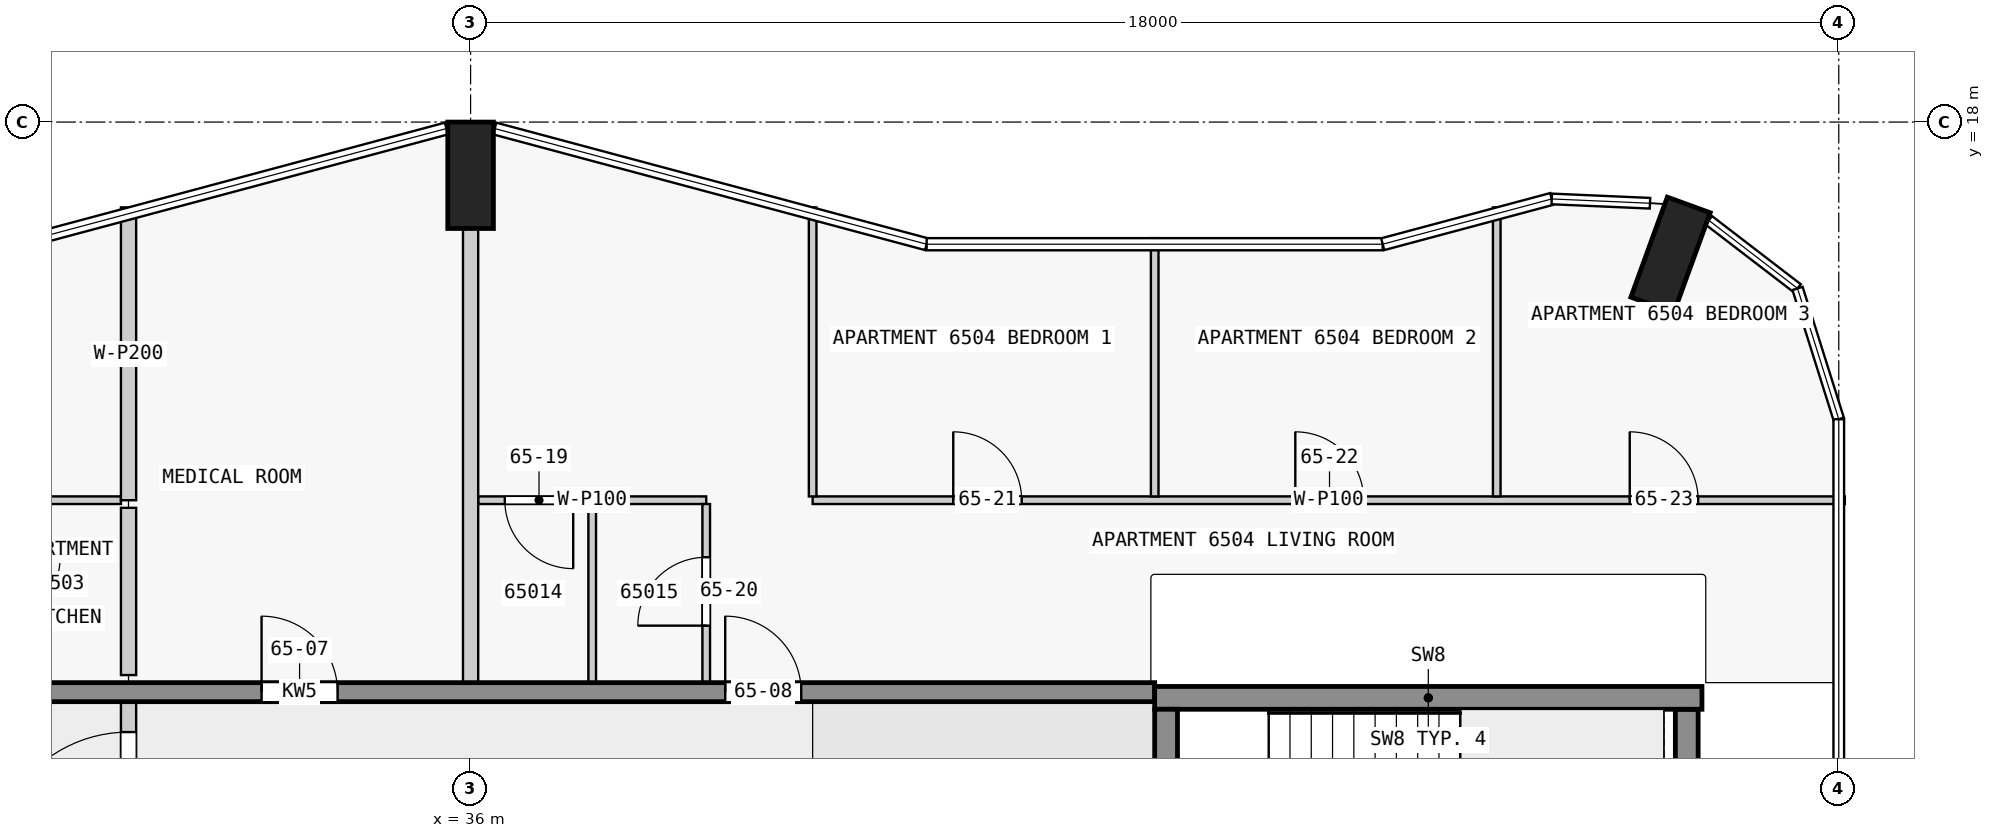
"""IFC4 building model, lengths in metres.
Left out: names, types, materials, properties, quantities, classifications, styles, units other than length and angle.
Written with IfcOpenShell. Run it as: python <this file> out.ifc"""

import sys

from ifc_helpers import new_model, si_unit, direction, frame, frame_2d, origin, origin_2d, place, context, subcontext, project, spatial, rectangle, extrude, element, fill, save


model = new_model("IFC4")
c1 = context("Model", 3, precision=1e-05, world=origin(), true_north=direction((0.0, 1.0)))
c2 = subcontext(c1, "Body", "Model", "MODEL_VIEW")
j1 = project(units=[si_unit("LENGTHUNIT", "METRE"), si_unit("PLANEANGLEUNIT", "RADIAN")], contexts=[c1])
p1 = place(None, origin())
s1 = spatial("IfcSite", under=j1, at=p1, CompositionType="ELEMENT")
p2 = place(p1, origin())
s2 = spatial("IfcBuilding", under=s1, at=p2, CompositionType="ELEMENT")
p3 = place(p2, frame((0.0, 0.0, 249.4)))
s3 = spatial("IfcBuildingStorey", under=s2, at=p3, CompositionType="ELEMENT", Elevation=249.4)
for number, where, z_axis, x_axis in (
    (1, (51.787, 16.252, 0.0), (0.0, 0.0, 1.0), (-0.94, 0.342, 0.0)),
    (2, (36.0, 17.3, 0.0), (0.0, 0.0, 1.0), (1.0, 0.0, 0.0)),
):
    element("IfcColumn", number, at=place(p3, frame(where, z_axis=z_axis, x_axis=x_axis)), inside=s3, PredefinedType="COLUMN", context=c2, shape_type="SweptSolid", body=[
        extrude(rectangle(XDim=0.6, YDim=1.4, at=origin_2d()), origin(), (0.0, 0.0, 1.0), 3.5),
    ])
p4 = place(p3, frame((45.15, 7.725, 0.0), z_axis=(0.0, 0.0, 1.0), x_axis=(0.0, 1.0, 0.0)))
e3 = element("IfcWall", 3, at=p4, inside=s3, PredefinedType="SHEAR", context=c2, shape_type="SweptSolid", body=[
    extrude(rectangle(XDim=2.55, YDim=0.3, at=frame_2d((1.275, 0.0))), origin(), (0.0, 0.0, 1.0), 3.5),
])
p5 = place(p4, frame((0.725, 0.0, 0.0)))
e4 = element("IfcOpeningElement", 4, at=p5, cuts=e3, PredefinedType="OPENING", context=c2, shape_type="SweptSolid", body=[
    extrude(rectangle(XDim=1.1, YDim=2.1, at=frame_2d((0.55, 1.05))), frame((0.0, 0.16, 0.0), z_axis=(0.0, -1.0, 0.0), x_axis=(1.0, 0.0, 0.0)), (0.0, 0.0, 1.0), 0.32),
])
p6 = place(p3, frame((52.0, 7.725, 0.0), z_axis=(0.0, 0.0, 1.0), x_axis=(0.0, 1.0, 0.0)))
e5 = element("IfcWall", 5, at=p6, inside=s3, PredefinedType="SHEAR", context=c2, shape_type="SweptSolid", body=[
    extrude(rectangle(XDim=2.55, YDim=0.3, at=frame_2d((1.275, 0.0))), origin(), (0.0, 0.0, 1.0), 3.5),
])
p7 = place(p3, frame((45.0, 10.425, 0.0), z_axis=(0.0, 0.0, 1.0), x_axis=(1.0, 0.0, 0.0)))
e6 = element("IfcWall", 6, at=p7, inside=s3, PredefinedType="SHEAR", context=c2, shape_type="SweptSolid", body=[
    extrude(rectangle(XDim=7.2, YDim=0.3, at=frame_2d((3.6, 0.0))), origin(), (0.0, 0.0, 1.0), 3.5),
])
p8 = place(p3, frame((22.5, 10.5, 0.0), z_axis=(0.0, 0.0, 1.0), x_axis=(1.0, 0.0, 0.0)))
e7 = element("IfcWall", 7, at=p8, inside=s3, PredefinedType="SHEAR", context=c2, shape_type="SweptSolid", body=[
    extrude(rectangle(XDim=22.5, YDim=0.25, at=frame_2d((11.25, 0.0))), origin(), (0.0, 0.0, 1.0), 3.25),
])
p9 = place(p8, frame((4.05, 0.0, 0.0)))
e8 = element("IfcOpeningElement", 8, at=p9, cuts=e7, PredefinedType="OPENING", context=c2, shape_type="SweptSolid", body=[
    extrude(rectangle(XDim=1.0, YDim=2.1, at=frame_2d((0.5, 1.05))), frame((0.0, 0.135, 0.0), z_axis=(0.0, -1.0, 0.0), x_axis=(1.0, 0.0, 0.0)), (0.0, 0.0, 1.0), 0.27),
])
p10 = place(p8, frame((10.75, 0.0, 0.0)))
e9 = element("IfcOpeningElement", 9, at=p10, cuts=e7, PredefinedType="OPENING", context=c2, shape_type="SweptSolid", body=[
    extrude(rectangle(XDim=1.0, YDim=2.1, at=frame_2d((0.5, 1.05))), frame((0.0, 0.135, 0.0), z_axis=(0.0, -1.0, 0.0), x_axis=(1.0, 0.0, 0.0)), (0.0, 0.0, 1.0), 0.27),
])
p11 = place(p8, frame((16.85, 0.0, 0.0)))
e10 = element("IfcOpeningElement", 10, at=p11, cuts=e7, PredefinedType="OPENING", context=c2, shape_type="SweptSolid", body=[
    extrude(rectangle(XDim=1.0, YDim=2.1, at=frame_2d((0.5, 1.05))), frame((0.0, 0.135, 0.0), z_axis=(0.0, -1.0, 0.0), x_axis=(1.0, 0.0, 0.0)), (0.0, 0.0, 1.0), 0.27),
])
p12 = place(p3, frame((31.4, 13.025, 0.0), z_axis=(0.0, 0.0, 1.0), x_axis=(-1.0, 0.0, 0.0)))
e11 = element("IfcWall", 11, at=p12, inside=s3, PredefinedType="PARTITIONING", context=c2, shape_type="SweptSolid", body=[
    extrude(rectangle(XDim=1.65, YDim=0.1, at=frame_2d((0.825, 0.0))), origin(), (0.0, 0.0, 1.0), 3.25),
])
p13 = place(p3, frame((39.1, 13.025, 0.0), z_axis=(0.0, 0.0, 1.0), x_axis=(-1.0, 0.0, 0.0)))
e12 = element("IfcWall", 12, at=p13, inside=s3, PredefinedType="PARTITIONING", context=c2, shape_type="SweptSolid", body=[
    extrude(rectangle(XDim=3.0, YDim=0.1, at=frame_2d((1.5, 0.0))), origin(), (0.0, 0.0, 1.0), 3.25),
])
p14 = place(p13, frame((1.75, 0.0, 0.0)))
e13 = element("IfcOpeningElement", 13, at=p14, cuts=e12, PredefinedType="OPENING", context=c2, shape_type="SweptSolid", body=[
    extrude(rectangle(XDim=0.9, YDim=2.1, at=frame_2d((0.45, 1.05))), frame((0.0, 0.06, 0.0), z_axis=(0.0, -1.0, 0.0), x_axis=(1.0, 0.0, 0.0)), (0.0, 0.0, 1.0), 0.12),
])
p15 = place(p3, frame((40.5, 13.025, 0.0), z_axis=(0.0, 0.0, 1.0), x_axis=(1.0, 0.0, 0.0)))
e14 = element("IfcWall", 14, at=p15, inside=s3, PredefinedType="PARTITIONING", context=c2, shape_type="SweptSolid", body=[
    extrude(rectangle(XDim=13.58, YDim=0.1, at=frame_2d((6.79, 0.0))), origin(), (0.0, 0.0, 1.0), 3.25),
])
p16 = place(p15, frame((1.85, 0.0, 0.0)))
e15 = element("IfcOpeningElement", 15, at=p16, cuts=e14, PredefinedType="OPENING", context=c2, shape_type="SweptSolid", body=[
    extrude(rectangle(XDim=0.9, YDim=2.1, at=frame_2d((0.45, 1.05))), frame((0.0, 0.06, 0.0), z_axis=(0.0, -1.0, 0.0), x_axis=(1.0, 0.0, 0.0)), (0.0, 0.0, 1.0), 0.12),
])
p17 = place(p15, frame((6.35, 0.0, 0.0)))
e16 = element("IfcOpeningElement", 16, at=p17, cuts=e14, PredefinedType="OPENING", context=c2, shape_type="SweptSolid", body=[
    extrude(rectangle(XDim=0.9, YDim=2.1, at=frame_2d((0.45, 1.05))), frame((0.0, 0.06, 0.0), z_axis=(0.0, -1.0, 0.0), x_axis=(1.0, 0.0, 0.0)), (0.0, 0.0, 1.0), 0.12),
])
p18 = place(p15, frame((10.75, 0.0, 0.0)))
e17 = element("IfcOpeningElement", 17, at=p18, cuts=e14, PredefinedType="OPENING", context=c2, shape_type="SweptSolid", body=[
    extrude(rectangle(XDim=0.9, YDim=2.1, at=frame_2d((0.45, 1.05))), frame((0.0, 0.06, 0.0), z_axis=(0.0, -1.0, 0.0), x_axis=(1.0, 0.0, 0.0)), (0.0, 0.0, 1.0), 0.12),
])
p19 = place(p3, frame((31.5, 16.878, 0.0), z_axis=(0.0, 0.0, 1.0), x_axis=(0.0, -1.0, 0.0)))
e18 = element("IfcWall", 18, at=p19, inside=s3, PredefinedType="PARTITIONING", context=c2, shape_type="SweptSolid", body=[
    extrude(rectangle(XDim=3.853, YDim=0.2, at=frame_2d((1.926, 0.0))), origin(), (0.0, 0.0, 1.0), 3.25),
])
p20 = place(p3, frame((31.5, 10.725, 0.0), z_axis=(0.0, 0.0, 1.0), x_axis=(0.0, 1.0, 0.0)))
e19 = element("IfcWall", 19, at=p20, inside=s3, PredefinedType="PARTITIONING", context=c2, shape_type="SweptSolid", body=[
    extrude(rectangle(XDim=2.2, YDim=0.2, at=frame_2d((1.1, 0.0))), origin(), (0.0, 0.0, 1.0), 3.25),
])
p21 = place(p3, frame((36.0, 10.625, 0.0), z_axis=(0.0, 0.0, 1.0), x_axis=(0.0, 1.0, 0.0)))
e20 = element("IfcWall", 20, at=p21, inside=s3, PredefinedType="PARTITIONING", context=c2, shape_type="SweptSolid", body=[
    extrude(rectangle(XDim=5.975, YDim=0.2, at=frame_2d((2.988, 0.0))), origin(), (0.0, 0.0, 1.0), 3.25),
])
p22 = place(p3, frame((37.6, 10.625, 0.0), z_axis=(0.0, 0.0, 1.0), x_axis=(0.0, 1.0, 0.0)))
e21 = element("IfcWall", 21, at=p22, inside=s3, PredefinedType="PARTITIONING", context=c2, shape_type="SweptSolid", body=[
    extrude(rectangle(XDim=2.35, YDim=0.1, at=frame_2d((1.175, 0.0))), origin(), (0.0, 0.0, 1.0), 3.25),
])
p23 = place(p3, frame((39.1, 10.625, 0.0), z_axis=(0.0, 0.0, 1.0), x_axis=(0.0, 1.0, 0.0)))
e22 = element("IfcWall", 22, at=p23, inside=s3, PredefinedType="PARTITIONING", context=c2, shape_type="SweptSolid", body=[
    extrude(rectangle(XDim=2.35, YDim=0.1, at=frame_2d((1.175, 0.0))), origin(), (0.0, 0.0, 1.0), 3.25),
])
p24 = place(p23, frame((0.75, 0.0, 0.0)))
e23 = element("IfcOpeningElement", 23, at=p24, cuts=e22, PredefinedType="OPENING", context=c2, shape_type="SweptSolid", body=[
    extrude(rectangle(XDim=0.9, YDim=2.1, at=frame_2d((0.45, 1.05))), frame((0.0, 0.06, 0.0), z_axis=(0.0, -1.0, 0.0), x_axis=(1.0, 0.0, 0.0)), (0.0, 0.0, 1.0), 0.12),
])
p25 = place(p3, frame((40.5, 16.878, 0.0), z_axis=(0.0, 0.0, 1.0), x_axis=(0.0, -1.0, 0.0)))
e24 = element("IfcWall", 24, at=p25, inside=s3, PredefinedType="PARTITIONING", context=c2, shape_type="SweptSolid", body=[
    extrude(rectangle(XDim=3.803, YDim=0.1, at=frame_2d((1.901, 0.0))), origin(), (0.0, 0.0, 1.0), 3.25),
])
p26 = place(p3, frame((45.0, 13.075, 0.0), z_axis=(0.0, 0.0, 1.0), x_axis=(0.0, 1.0, 0.0)))
e25 = element("IfcWall", 25, at=p26, inside=s3, PredefinedType="PARTITIONING", context=c2, shape_type="SweptSolid", body=[
    extrude(rectangle(XDim=3.398, YDim=0.1, at=frame_2d((1.699, 0.0))), origin(), (0.0, 0.0, 1.0), 3.25),
])
p27 = place(p3, frame((49.5, 13.075, 0.0), z_axis=(0.0, 0.0, 1.0), x_axis=(0.0, 1.0, 0.0)))
e26 = element("IfcWall", 26, at=p27, inside=s3, PredefinedType="PARTITIONING", context=c2, shape_type="SweptSolid", body=[
    extrude(rectangle(XDim=3.803, YDim=0.1, at=frame_2d((1.901, 0.0))), origin(), (0.0, 0.0, 1.0), 3.25),
])
p28 = place(p3, frame((31.5, 7.475, 0.0), z_axis=(0.0, 0.0, 1.0), x_axis=(0.0, 1.0, 0.0)))
e27 = element("IfcWall", 27, at=p28, inside=s3, PredefinedType="PARTITIONING", context=c2, shape_type="SweptSolid", body=[
    extrude(rectangle(XDim=3.15, YDim=0.2, at=frame_2d((1.575, 0.0))), origin(), (0.0, 0.0, 1.0), 3.25),
])
p29 = place(p28, frame((0.7, 0.0, 0.0)))
e28 = element("IfcOpeningElement", 28, at=p29, cuts=e27, PredefinedType="OPENING", context=c2, shape_type="SweptSolid", body=[
    extrude(rectangle(XDim=1.8, YDim=2.1, at=frame_2d((0.9, 1.05))), frame((0.0, 0.11, 0.0), z_axis=(0.0, -1.0, 0.0), x_axis=(1.0, 0.0, 0.0)), (0.0, 0.0, 1.0), 0.22),
])
p30 = place(p10, origin())
e29 = element("IfcDoor", 29, at=p30, inside=s3, OperationType="SINGLE_SWING_LEFT", PredefinedType="DOOR", context=c2, shape_type="SweptSolid", body=[
    extrude(rectangle(XDim=1.0, YDim=2.1, at=frame_2d((0.5, 1.05))), frame((0.0, 0.025, 0.0), z_axis=(0.0, -1.0, 0.0), x_axis=(1.0, 0.0, 0.0)), (0.0, 0.0, 1.0), 0.05),
])
fill(e9, e29)
p31 = place(p11, origin())
e30 = element("IfcDoor", 30, at=p31, inside=s3, OperationType="SINGLE_SWING_RIGHT", PredefinedType="DOOR", context=c2, shape_type="SweptSolid", body=[
    extrude(rectangle(XDim=1.0, YDim=2.1, at=frame_2d((0.5, 1.05))), frame((0.0, 0.025, 0.0), z_axis=(0.0, -1.0, 0.0), x_axis=(1.0, 0.0, 0.0)), (0.0, 0.0, 1.0), 0.05),
])
fill(e10, e30)
p32 = place(p29, origin())
e31 = element("IfcDoor", 31, at=p32, inside=s3, OperationType="SINGLE_SWING_RIGHT", PredefinedType="DOOR", context=c2, shape_type="SweptSolid", body=[
    extrude(rectangle(XDim=1.8, YDim=2.1, at=frame_2d((0.9, 1.05))), frame((0.0, 0.025, 0.0), z_axis=(0.0, -1.0, 0.0), x_axis=(1.0, 0.0, 0.0)), (0.0, 0.0, 1.0), 0.05),
])
fill(e28, e31)
p33 = place(p14, origin())
e32 = element("IfcDoor", 32, at=p33, inside=s3, OperationType="SINGLE_SWING_RIGHT", PredefinedType="DOOR", context=c2, shape_type="SweptSolid", body=[
    extrude(rectangle(XDim=0.9, YDim=2.1, at=frame_2d((0.45, 1.05))), frame((0.0, 0.025, 0.0), z_axis=(0.0, -1.0, 0.0), x_axis=(1.0, 0.0, 0.0)), (0.0, 0.0, 1.0), 0.05),
])
fill(e13, e32)
p34 = place(p24, origin())
e33 = element("IfcDoor", 33, at=p34, inside=s3, OperationType="SINGLE_SWING_RIGHT", PredefinedType="DOOR", context=c2, shape_type="SweptSolid", body=[
    extrude(rectangle(XDim=0.9, YDim=2.1, at=frame_2d((0.45, 1.05))), frame((0.0, 0.025, 0.0), z_axis=(0.0, -1.0, 0.0), x_axis=(1.0, 0.0, 0.0)), (0.0, 0.0, 1.0), 0.05),
])
fill(e23, e33)
p35 = place(p16, origin())
e34 = element("IfcDoor", 34, at=p35, inside=s3, OperationType="SINGLE_SWING_LEFT", PredefinedType="DOOR", context=c2, shape_type="SweptSolid", body=[
    extrude(rectangle(XDim=0.9, YDim=2.1, at=frame_2d((0.45, 1.05))), frame((0.0, 0.025, 0.0), z_axis=(0.0, -1.0, 0.0), x_axis=(1.0, 0.0, 0.0)), (0.0, 0.0, 1.0), 0.05),
])
fill(e15, e34)
p36 = place(p17, origin())
e35 = element("IfcDoor", 35, at=p36, inside=s3, OperationType="SINGLE_SWING_RIGHT", PredefinedType="DOOR", context=c2, shape_type="SweptSolid", body=[
    extrude(rectangle(XDim=0.9, YDim=2.1, at=frame_2d((0.45, 1.05))), frame((0.0, 0.025, 0.0), z_axis=(0.0, -1.0, 0.0), x_axis=(1.0, 0.0, 0.0)), (0.0, 0.0, 1.0), 0.05),
])
fill(e16, e35)
p37 = place(p18, origin())
e36 = element("IfcDoor", 36, at=p37, inside=s3, OperationType="SINGLE_SWING_RIGHT", PredefinedType="DOOR", context=c2, shape_type="SweptSolid", body=[
    extrude(rectangle(XDim=0.9, YDim=2.1, at=frame_2d((0.45, 1.05))), frame((0.0, 0.025, 0.0), z_axis=(0.0, -1.0, 0.0), x_axis=(1.0, 0.0, 0.0)), (0.0, 0.0, 1.0), 0.05),
])
fill(e17, e36)
save(model, sys.argv[1])
